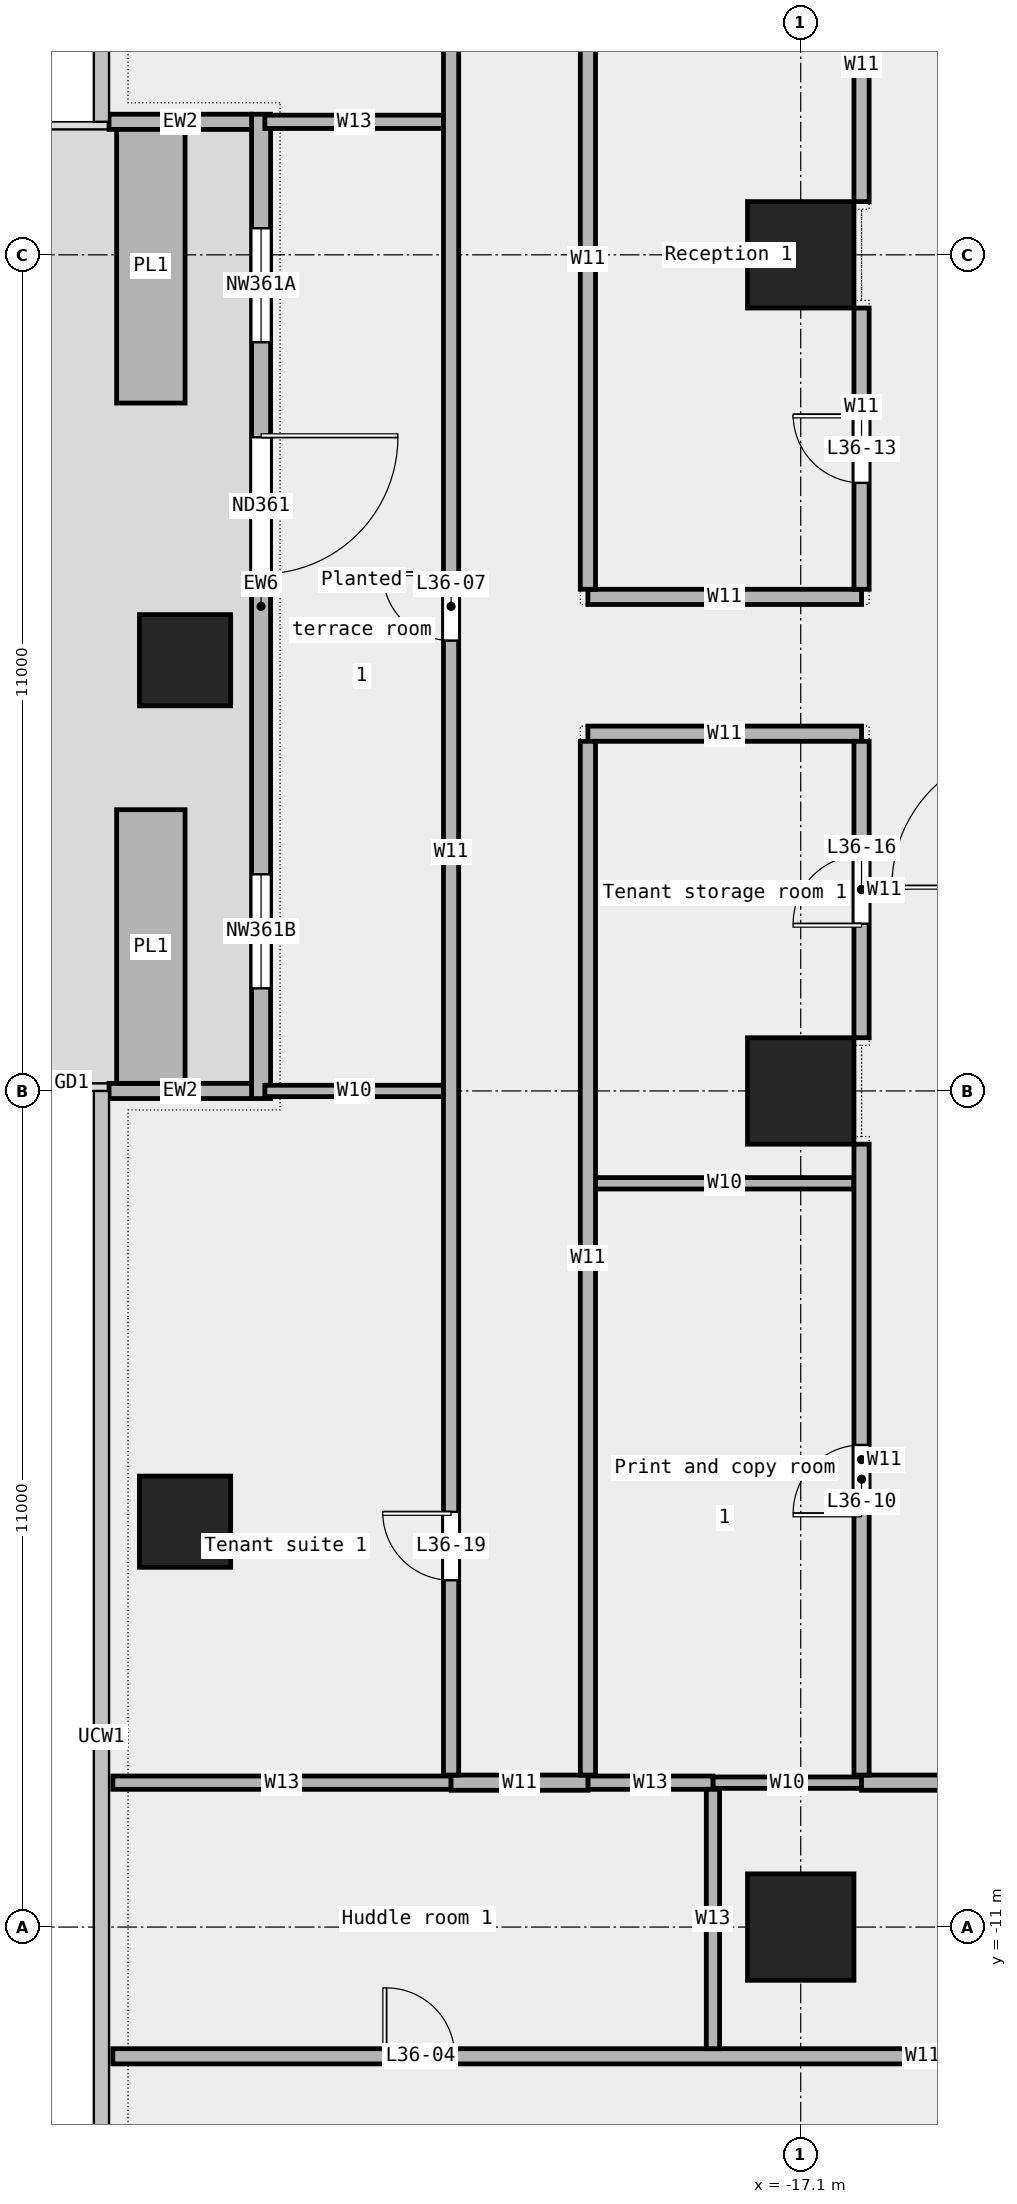
"""IFC4 building model, lengths in metres.
Left out: names, types, materials, properties, quantities, classifications, styles, units other than length and angle.
Written with IfcOpenShell. Run it as: python <this file> out.ifc"""

import sys

from ifc_helpers import new_model, si_unit, direction, frame, frame_2d, origin, origin_2d, place, context, subcontext, project, spatial, rectangle, extrude, element, fill, save


model = new_model("IFC4")
c1 = context("Model", 3, precision=1e-05, world=origin(), true_north=direction((0.0, 1.0)))
c2 = subcontext(c1, "Body", "Model", "MODEL_VIEW")
j1 = project(units=[si_unit("LENGTHUNIT", "METRE"), si_unit("PLANEANGLEUNIT", "RADIAN")], contexts=[c1])
p1 = place(None, origin())
s1 = spatial("IfcSite", under=j1, at=p1, CompositionType="ELEMENT")
p2 = place(p1, origin())
s2 = spatial("IfcBuilding", under=s1, at=p2, CompositionType="ELEMENT")
p3 = place(p2, frame((0.0, 0.0, 177.0)))
s3 = spatial("IfcBuildingStorey", under=s2, at=p3, CompositionType="ELEMENT", Elevation=177.0)
for number, where, z_axis, x_axis in (
    (1, (-25.2, 5.667, 0.0), (0.0, 0.0, 1.0), (1.0, 0.0, 0.0)),
    (2, (-25.2, -5.667, 0.0), (0.0, 0.0, 1.0), (1.0, 0.0, 0.0)),
):
    element("IfcColumn", number, at=place(p3, frame(where, z_axis=z_axis, x_axis=x_axis)), inside=s3, PredefinedType="COLUMN", context=c2, shape_type="SweptSolid", body=[
        extrude(rectangle(XDim=1.2, YDim=1.2, at=origin_2d()), origin(), (0.0, 0.0, 1.0), 3.6),
    ])
for number, where, z_axis, x_axis in (
    (3, (-17.1, -11.0, 0.0), (0.0, 0.0, 1.0), (1.0, 0.0, 0.0)),
    (4, (-17.1, 0.0, 0.0), (0.0, 0.0, 1.0), (1.0, 0.0, 0.0)),
    (5, (-17.1, 11.0, 0.0), (0.0, 0.0, 1.0), (1.0, 0.0, 0.0)),
):
    element("IfcColumn", number, at=place(p3, frame(where, z_axis=z_axis, x_axis=x_axis)), inside=s3, PredefinedType="COLUMN", context=c2, shape_type="SweptSolid", body=[
        extrude(rectangle(XDim=1.4, YDim=1.4, at=origin_2d()), origin(), (0.0, 0.0, 1.0), 3.6),
    ])
p4 = place(p3, frame((-24.2, 12.85, 0.0), z_axis=(0.0, 0.0, 1.0), x_axis=(0.0, -1.0, 0.0)))
e6 = element("IfcWall", 6, at=p4, inside=s3, PredefinedType="STANDARD", context=c2, shape_type="SweptSolid", body=[
    extrude(rectangle(XDim=12.95, YDim=0.25, at=frame_2d((6.475, 0.0))), origin(), (0.0, 0.0, 1.0), 3.6),
])
p5 = place(p4, frame((1.5, 0.0, 0.45)))
e7 = element("IfcOpeningElement", 7, at=p5, cuts=e6, PredefinedType="OPENING", context=c2, shape_type="SweptSolid", body=[
    extrude(rectangle(XDim=1.5, YDim=2.4, at=frame_2d((0.75, 1.2))), frame((0.0, 0.137, 0.0), z_axis=(0.0, -1.0, 0.0), x_axis=(1.0, 0.0, 0.0)), (0.0, 0.0, 1.0), 0.274),
])
p6 = place(p4, frame((4.25, 0.0, 0.0)))
e8 = element("IfcOpeningElement", 8, at=p6, cuts=e6, PredefinedType="OPENING", context=c2, shape_type="SweptSolid", body=[
    extrude(rectangle(XDim=1.8, YDim=2.4, at=frame_2d((0.9, 1.2))), frame((0.0, 0.137, 0.0), z_axis=(0.0, -1.0, 0.0), x_axis=(1.0, 0.0, 0.0)), (0.0, 0.0, 1.0), 0.274),
])
p7 = place(p4, frame((10.0, 0.0, 0.45)))
e9 = element("IfcOpeningElement", 9, at=p7, cuts=e6, PredefinedType="OPENING", context=c2, shape_type="SweptSolid", body=[
    extrude(rectangle(XDim=1.5, YDim=2.4, at=frame_2d((0.75, 1.2))), frame((0.0, 0.137, 0.0), z_axis=(0.0, -1.0, 0.0), x_axis=(1.0, 0.0, 0.0)), (0.0, 0.0, 1.0), 0.274),
])
for number, where, z_axis, x_axis in (
    (10, (-26.2, 12.75, 0.0), (0.0, 0.0, 1.0), (1.0, 0.0, 0.0)),
    (11, (-26.2, 0.0, 0.0), (0.0, 0.0, 1.0), (1.0, 0.0, 0.0)),
):
    element("IfcWall", number, at=place(p3, frame(where, z_axis=z_axis, x_axis=x_axis)), inside=s3, PredefinedType="STANDARD", context=c2, shape_type="SweptSolid", body=[
        extrude(rectangle(XDim=1.875, YDim=0.2, at=frame_2d((0.938, 0.0))), origin(), (0.0, 0.0, 1.0), 3.6),
    ])
for number, where, z_axis, x_axis in (
    (12, (-25.65, 12.65, 0.0), (0.0, 0.0, 1.0), (0.0, -1.0, 0.0)),
    (13, (-25.65, 3.7, 0.0), (0.0, 0.0, 1.0), (0.0, -1.0, 0.0)),
):
    element("IfcWall", number, at=place(p3, frame(where, z_axis=z_axis, x_axis=x_axis)), inside=s3, PredefinedType="STANDARD", context=c2, shape_type="SweptSolid", body=[
        extrude(rectangle(XDim=3.6, YDim=0.9, at=frame_2d((1.8, 0.0))), origin(), (0.0, 0.0, 1.0), 0.7),
    ])
p8 = place(p3, frame((-26.15, -12.7, 0.0), z_axis=(0.0, 0.0, 1.0), x_axis=(1.0, 0.0, 0.0)))
e14 = element("IfcWall", 14, at=p8, inside=s3, PredefinedType="PARTITIONING", context=c2, shape_type="SweptSolid", body=[
    extrude(rectangle(XDim=21.31, YDim=0.2, at=frame_2d((10.655, 0.0))), origin(), (0.0, 0.0, 1.0), 3.6),
])
p9 = place(p8, frame((3.597, 0.0, 0.0)))
e15 = element("IfcOpeningElement", 15, at=p9, cuts=e14, PredefinedType="OPENING", context=c2, shape_type="SweptSolid", body=[
    extrude(rectangle(XDim=0.9, YDim=2.1, at=frame_2d((0.45, 1.05))), frame((0.0, 0.112, 0.0), z_axis=(0.0, -1.0, 0.0), x_axis=(1.0, 0.0, 0.0)), (0.0, 0.0, 1.0), 0.224),
])
p10 = place(p8, frame((14.002, 0.0, 0.0)))
e16 = element("IfcOpeningElement", 16, at=p10, cuts=e14, PredefinedType="OPENING", context=c2, shape_type="SweptSolid", body=[
    extrude(rectangle(XDim=1.2, YDim=2.1, at=frame_2d((0.6, 1.05))), frame((0.0, 0.112, 0.0), z_axis=(0.0, -1.0, 0.0), x_axis=(1.0, 0.0, 0.0)), (0.0, 0.0, 1.0), 0.224),
])
p11 = place(p3, frame((-18.255, -9.1, 0.0), z_axis=(0.0, 0.0, 1.0), x_axis=(1.0, 0.0, 0.0)))
e17 = element("IfcWall", 17, at=p11, inside=s3, PredefinedType="PARTITIONING", context=c2, shape_type="SweptSolid", body=[
    extrude(rectangle(XDim=1.955, YDim=0.15, at=frame_2d((0.978, 0.0))), origin(), (0.0, 0.0, 1.0), 3.6),
])
p12 = place(p3, frame((-26.15, -9.1, 0.0), z_axis=(0.0, 0.0, 1.0), x_axis=(1.0, 0.0, 0.0)))
e18 = element("IfcWall", 18, at=p12, inside=s3, PredefinedType="PARTITIONING", context=c2, shape_type="SweptSolid", body=[
    extrude(rectangle(XDim=4.45, YDim=0.175, at=frame_2d((2.225, 0.0))), origin(), (0.0, 0.0, 1.0), 3.6),
])
p13 = place(p3, frame((-19.9, -9.1, 0.0), z_axis=(0.0, 0.0, 1.0), x_axis=(1.0, 0.0, 0.0)))
e19 = element("IfcWall", 19, at=p13, inside=s3, PredefinedType="PARTITIONING", context=c2, shape_type="SweptSolid", body=[
    extrude(rectangle(XDim=1.645, YDim=0.175, at=frame_2d((0.823, 0.0))), origin(), (0.0, 0.0, 1.0), 3.6),
])
p14 = place(p3, frame((-21.7, -9.1, 0.0), z_axis=(0.0, 0.0, 1.0), x_axis=(1.0, 0.0, 0.0)))
e20 = element("IfcWall", 20, at=p14, inside=s3, PredefinedType="PARTITIONING", context=c2, shape_type="SweptSolid", body=[
    extrude(rectangle(XDim=1.8, YDim=0.2, at=frame_2d((0.9, 0.0))), origin(), (0.0, 0.0, 1.0), 3.6),
])
p15 = place(p3, frame((-16.3, -9.1, 0.0), z_axis=(0.0, 0.0, 1.0), x_axis=(1.0, 0.0, 0.0)))
e21 = element("IfcWall", 21, at=p15, inside=s3, PredefinedType="PARTITIONING", context=c2, shape_type="SweptSolid", body=[
    extrude(rectangle(XDim=11.46, YDim=0.2, at=frame_2d((5.73, 0.0))), origin(), (0.0, 0.0, 1.0), 3.6),
])
p16 = place(p3, frame((-19.8, -1.215, 0.0), z_axis=(0.0, 0.0, 1.0), x_axis=(1.0, 0.0, 0.0)))
e22 = element("IfcWall", 22, at=p16, inside=s3, PredefinedType="PARTITIONING", context=c2, shape_type="SweptSolid", body=[
    extrude(rectangle(XDim=3.4, YDim=0.15, at=frame_2d((1.7, 0.0))), origin(), (0.0, 0.0, 1.0), 3.6),
])
p17 = place(p3, frame((-24.15, 0.0, 0.0), z_axis=(0.0, 0.0, 1.0), x_axis=(1.0, 0.0, 0.0)))
e23 = element("IfcWall", 23, at=p17, inside=s3, PredefinedType="PARTITIONING", context=c2, shape_type="SweptSolid", body=[
    extrude(rectangle(XDim=2.35, YDim=0.15, at=frame_2d((1.175, 0.0))), origin(), (0.0, 0.0, 1.0), 3.6),
])
for number, where, z_axis, x_axis in (
    (24, (-19.9, 4.7, 0.0), (0.0, 0.0, 1.0), (1.0, 0.0, 0.0)),
    (25, (-19.9, 6.5, 0.0), (0.0, 0.0, 1.0), (1.0, 0.0, 0.0)),
):
    element("IfcWall", number, at=place(p3, frame(where, z_axis=z_axis, x_axis=x_axis)), inside=s3, PredefinedType="PARTITIONING", context=c2, shape_type="SweptSolid", body=[
        extrude(rectangle(XDim=3.6, YDim=0.2, at=frame_2d((1.8, 0.0))), origin(), (0.0, 0.0, 1.0), 3.6),
    ])
p18 = place(p3, frame((-24.15, 12.75, 0.0), z_axis=(0.0, 0.0, 1.0), x_axis=(1.0, 0.0, 0.0)))
e26 = element("IfcWall", 26, at=p18, inside=s3, PredefinedType="PARTITIONING", context=c2, shape_type="SweptSolid", body=[
    extrude(rectangle(XDim=2.35, YDim=0.175, at=frame_2d((1.175, 0.0))), origin(), (0.0, 0.0, 1.0), 3.6),
])
p19 = place(p3, frame((-21.7, -9.0, 0.0), z_axis=(0.0, 0.0, 1.0), x_axis=(0.0, 1.0, 0.0)))
e27 = element("IfcWall", 27, at=p19, inside=s3, PredefinedType="PARTITIONING", context=c2, shape_type="SweptSolid", body=[
    extrude(rectangle(XDim=24.3, YDim=0.2, at=frame_2d((12.15, 0.0))), origin(), (0.0, 0.0, 1.0), 3.6),
])
p20 = place(p19, frame((14.925, 0.0, 0.0)))
e28 = element("IfcOpeningElement", 28, at=p20, cuts=e27, PredefinedType="OPENING", context=c2, shape_type="SweptSolid", body=[
    extrude(rectangle(XDim=0.9, YDim=2.1, at=frame_2d((0.45, 1.05))), frame((0.0, 0.112, 0.0), z_axis=(0.0, -1.0, 0.0), x_axis=(1.0, 0.0, 0.0)), (0.0, 0.0, 1.0), 0.224),
])
p21 = place(p19, frame((2.562, 0.0, 0.0)))
e29 = element("IfcOpeningElement", 29, at=p21, cuts=e27, PredefinedType="OPENING", context=c2, shape_type="SweptSolid", body=[
    extrude(rectangle(XDim=0.9, YDim=2.1, at=frame_2d((0.45, 1.05))), frame((0.0, 0.112, 0.0), z_axis=(0.0, -1.0, 0.0), x_axis=(1.0, 0.0, 0.0)), (0.0, 0.0, 1.0), 0.224),
])
p22 = place(p3, frame((-19.9, -9.0, 0.0), z_axis=(0.0, 0.0, 1.0), x_axis=(0.0, 1.0, 0.0)))
e30 = element("IfcWall", 30, at=p22, inside=s3, PredefinedType="PARTITIONING", context=c2, shape_type="SweptSolid", body=[
    extrude(rectangle(XDim=13.6, YDim=0.2, at=frame_2d((6.8, 0.0))), origin(), (0.0, 0.0, 1.0), 3.6),
])
p23 = place(p3, frame((-19.9, 6.6, 0.0), z_axis=(0.0, 0.0, 1.0), x_axis=(0.0, 1.0, 0.0)))
e31 = element("IfcWall", 31, at=p23, inside=s3, PredefinedType="PARTITIONING", context=c2, shape_type="SweptSolid", body=[
    extrude(rectangle(XDim=8.7, YDim=0.2, at=frame_2d((4.35, 0.0))), origin(), (0.0, 0.0, 1.0), 3.6),
])
p24 = place(p3, frame((-18.255, -12.6, 0.0), z_axis=(0.0, 0.0, 1.0), x_axis=(0.0, 1.0, 0.0)))
e32 = element("IfcWall", 32, at=p24, inside=s3, PredefinedType="PARTITIONING", context=c2, shape_type="SweptSolid", body=[
    extrude(rectangle(XDim=3.412, YDim=0.175, at=frame_2d((1.706, 0.0))), origin(), (0.0, 0.0, 1.0), 3.6),
])
p25 = place(p3, frame((-16.3, -9.0, 0.0), z_axis=(0.0, 0.0, 1.0), x_axis=(0.0, 1.0, 0.0)))
e33 = element("IfcWall", 33, at=p25, inside=s3, PredefinedType="PARTITIONING", context=c2, shape_type="SweptSolid", body=[
    extrude(rectangle(XDim=8.3, YDim=0.2, at=frame_2d((4.15, 0.0))), origin(), (0.0, 0.0, 1.0), 3.6),
])
p26 = place(p25, frame((3.442, 0.0, 0.0)))
e34 = element("IfcOpeningElement", 34, at=p26, cuts=e33, PredefinedType="OPENING", context=c2, shape_type="SweptSolid", body=[
    extrude(rectangle(XDim=0.9, YDim=2.1, at=frame_2d((0.45, 1.05))), frame((0.0, 0.112, 0.0), z_axis=(0.0, -1.0, 0.0), x_axis=(1.0, 0.0, 0.0)), (0.0, 0.0, 1.0), 0.224),
])
p27 = place(p3, frame((-16.3, 0.7, 0.0), z_axis=(0.0, 0.0, 1.0), x_axis=(0.0, 1.0, 0.0)))
e35 = element("IfcWall", 35, at=p27, inside=s3, PredefinedType="PARTITIONING", context=c2, shape_type="SweptSolid", body=[
    extrude(rectangle(XDim=3.9, YDim=0.2, at=frame_2d((1.95, 0.0))), origin(), (0.0, 0.0, 1.0), 3.6),
])
p28 = place(p27, frame((1.5, 0.0, 0.0)))
e36 = element("IfcOpeningElement", 36, at=p28, cuts=e35, PredefinedType="OPENING", context=c2, shape_type="SweptSolid", body=[
    extrude(rectangle(XDim=0.9, YDim=2.1, at=frame_2d((0.45, 1.05))), frame((0.0, 0.112, 0.0), z_axis=(0.0, -1.0, 0.0), x_axis=(1.0, 0.0, 0.0)), (0.0, 0.0, 1.0), 0.224),
])
p29 = place(p3, frame((-16.3, 6.6, 0.0), z_axis=(0.0, 0.0, 1.0), x_axis=(0.0, 1.0, 0.0)))
e37 = element("IfcWall", 37, at=p29, inside=s3, PredefinedType="PARTITIONING", context=c2, shape_type="SweptSolid", body=[
    extrude(rectangle(XDim=3.7, YDim=0.2, at=frame_2d((1.85, 0.0))), origin(), (0.0, 0.0, 1.0), 3.6),
])
p30 = place(p29, frame((1.4, 0.0, 0.0)))
e38 = element("IfcOpeningElement", 38, at=p30, cuts=e37, PredefinedType="OPENING", context=c2, shape_type="SweptSolid", body=[
    extrude(rectangle(XDim=0.9, YDim=2.1, at=frame_2d((0.45, 1.05))), frame((0.0, 0.112, 0.0), z_axis=(0.0, -1.0, 0.0), x_axis=(1.0, 0.0, 0.0)), (0.0, 0.0, 1.0), 0.224),
])
p31 = place(p3, frame((-16.3, 11.7, 0.0), z_axis=(0.0, 0.0, 1.0), x_axis=(0.0, 1.0, 0.0)))
e39 = element("IfcWall", 39, at=p31, inside=s3, PredefinedType="PARTITIONING", context=c2, shape_type="SweptSolid", body=[
    extrude(rectangle(XDim=3.6, YDim=0.2, at=frame_2d((1.8, 0.0))), origin(), (0.0, 0.0, 1.0), 3.6),
])
p32 = place(p5, origin())
e40 = element("IfcWindow", 40, at=p32, inside=s3, PartitioningType="SINGLE_PANEL", PredefinedType="WINDOW", context=c2, shape_type="SweptSolid", body=[
    extrude(rectangle(XDim=1.5, YDim=2.4, at=frame_2d((0.75, 1.2))), frame((0.0, 0.03, 0.0), z_axis=(0.0, -1.0, 0.0), x_axis=(1.0, 0.0, 0.0)), (0.0, 0.0, 1.0), 0.06),
])
fill(e7, e40)
p33 = place(p6, origin())
e41 = element("IfcDoor", 41, at=p33, inside=s3, OperationType="DOUBLE_DOOR_SINGLE_SWING", PredefinedType="DOOR", context=c2, shape_type="SweptSolid", body=[
    extrude(rectangle(XDim=1.8, YDim=2.4, at=frame_2d((0.9, 1.2))), frame((0.0, 0.025, 0.0), z_axis=(0.0, -1.0, 0.0), x_axis=(1.0, 0.0, 0.0)), (0.0, 0.0, 1.0), 0.05),
])
fill(e8, e41)
p34 = place(p7, origin())
e42 = element("IfcWindow", 42, at=p34, inside=s3, PartitioningType="SINGLE_PANEL", PredefinedType="WINDOW", context=c2, shape_type="SweptSolid", body=[
    extrude(rectangle(XDim=1.5, YDim=2.4, at=frame_2d((0.75, 1.2))), frame((0.0, 0.03, 0.0), z_axis=(0.0, -1.0, 0.0), x_axis=(1.0, 0.0, 0.0)), (0.0, 0.0, 1.0), 0.06),
])
fill(e9, e42)
p35 = place(p9, origin())
e43 = element("IfcDoor", 43, at=p35, inside=s3, OperationType="SINGLE_SWING_LEFT", PredefinedType="DOOR", context=c2, shape_type="SweptSolid", body=[
    extrude(rectangle(XDim=0.9, YDim=2.1, at=frame_2d((0.45, 1.05))), frame((0.0, 0.025, 0.0), z_axis=(0.0, -1.0, 0.0), x_axis=(1.0, 0.0, 0.0)), (0.0, 0.0, 1.0), 0.05),
])
fill(e15, e43)
p36 = place(p20, origin())
e44 = element("IfcDoor", 44, at=p36, inside=s3, OperationType="SINGLE_SWING_RIGHT", PredefinedType="DOOR", context=c2, shape_type="SweptSolid", body=[
    extrude(rectangle(XDim=0.9, YDim=2.1, at=frame_2d((0.45, 1.05))), frame((0.0, 0.025, 0.0), z_axis=(0.0, -1.0, 0.0), x_axis=(1.0, 0.0, 0.0)), (0.0, 0.0, 1.0), 0.05),
])
fill(e28, e44)
p37 = place(p26, origin())
e45 = element("IfcDoor", 45, at=p37, inside=s3, OperationType="SINGLE_SWING_LEFT", PredefinedType="DOOR", context=c2, shape_type="SweptSolid", body=[
    extrude(rectangle(XDim=0.9, YDim=2.1, at=frame_2d((0.45, 1.05))), frame((0.0, 0.025, 0.0), z_axis=(0.0, -1.0, 0.0), x_axis=(1.0, 0.0, 0.0)), (0.0, 0.0, 1.0), 0.05),
])
fill(e34, e45)
p38 = place(p30, origin())
e46 = element("IfcDoor", 46, at=p38, inside=s3, OperationType="SINGLE_SWING_RIGHT", PredefinedType="DOOR", context=c2, shape_type="SweptSolid", body=[
    extrude(rectangle(XDim=0.9, YDim=2.1, at=frame_2d((0.45, 1.05))), frame((0.0, 0.025, 0.0), z_axis=(0.0, -1.0, 0.0), x_axis=(1.0, 0.0, 0.0)), (0.0, 0.0, 1.0), 0.05),
])
fill(e38, e46)
p39 = place(p28, origin())
e47 = element("IfcDoor", 47, at=p39, inside=s3, OperationType="SINGLE_SWING_LEFT", PredefinedType="DOOR", context=c2, shape_type="SweptSolid", body=[
    extrude(rectangle(XDim=0.9, YDim=2.1, at=frame_2d((0.45, 1.05))), frame((0.0, 0.025, 0.0), z_axis=(0.0, -1.0, 0.0), x_axis=(1.0, 0.0, 0.0)), (0.0, 0.0, 1.0), 0.05),
])
fill(e36, e47)
p40 = place(p21, origin())
e48 = element("IfcDoor", 48, at=p40, inside=s3, OperationType="SINGLE_SWING_RIGHT", PredefinedType="DOOR", context=c2, shape_type="SweptSolid", body=[
    extrude(rectangle(XDim=0.9, YDim=2.1, at=frame_2d((0.45, 1.05))), frame((0.0, 0.025, 0.0), z_axis=(0.0, -1.0, 0.0), x_axis=(1.0, 0.0, 0.0)), (0.0, 0.0, 1.0), 0.05),
])
fill(e29, e48)
save(model, sys.argv[1])
